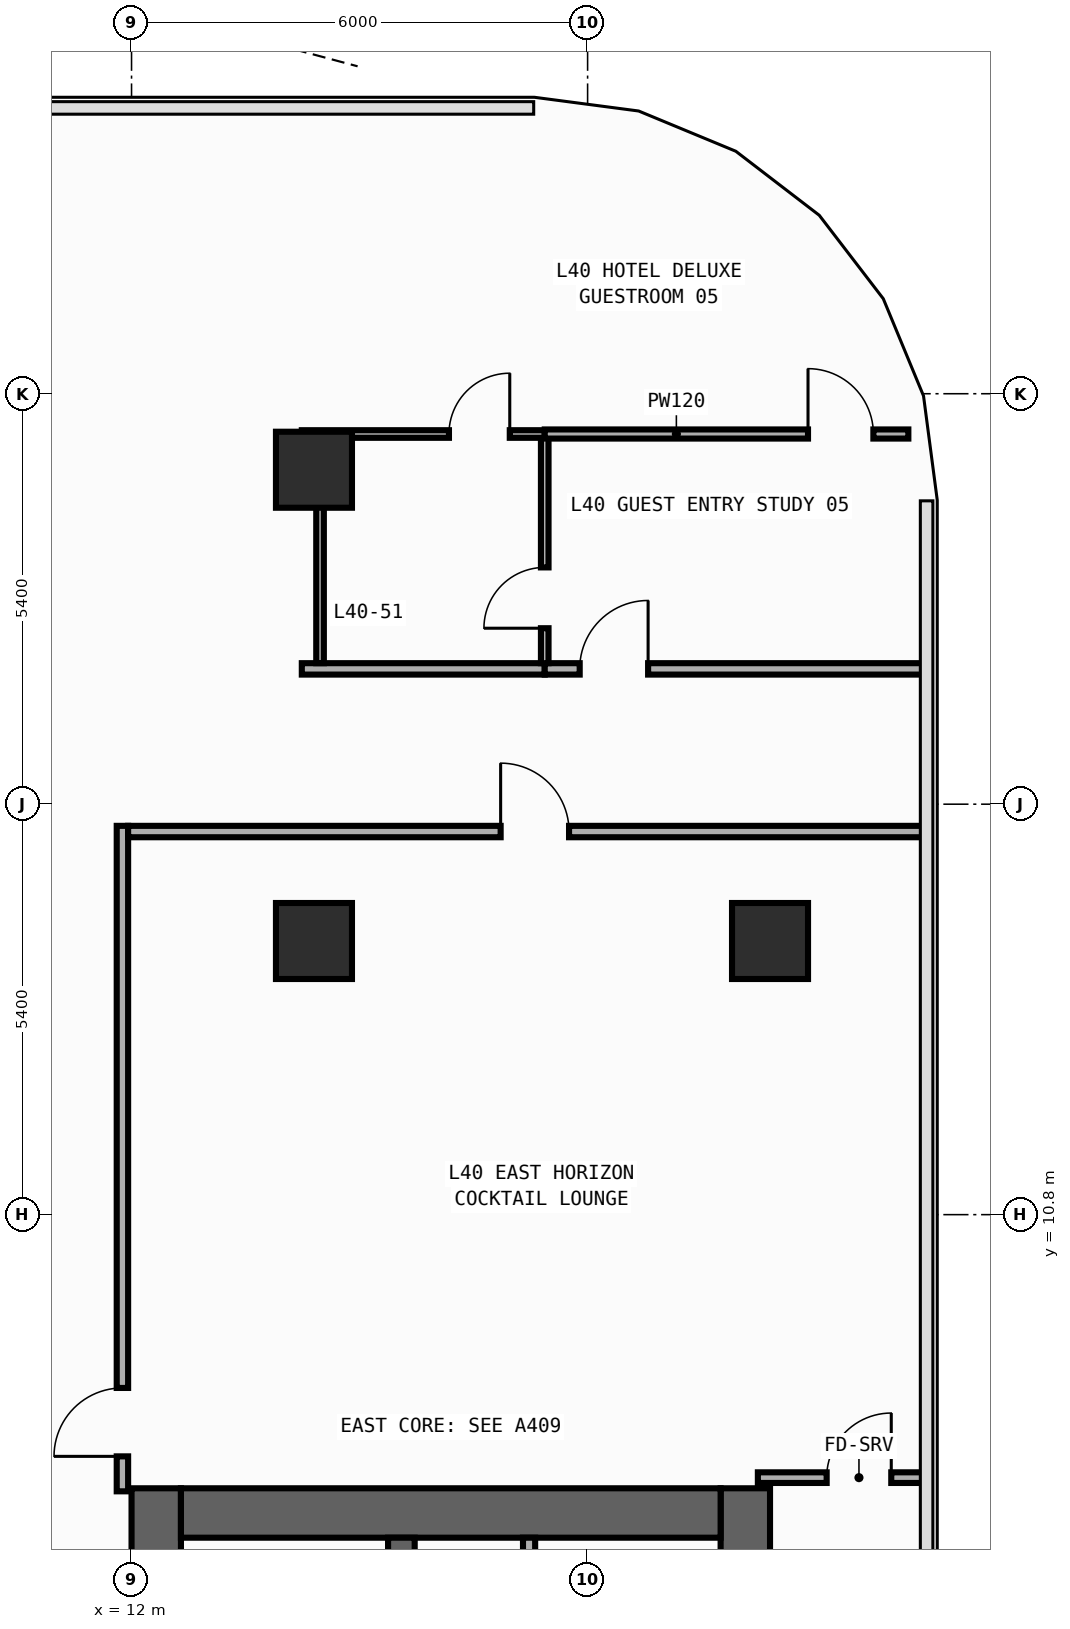
"""IFC4 building model, lengths in metres.
Left out: names, types, materials, properties, quantities, classifications, styles, units other than length and angle.
Written with IfcOpenShell. Run it as: python <this file> out.ifc"""

import sys

from ifc_helpers import new_model, si_unit, direction, frame, frame_2d, origin, origin_2d, place, context, subcontext, project, spatial, rectangle, extrude, element, fill, save


model = new_model("IFC4")
c1 = context("Model", 3, precision=1e-05, world=origin(), true_north=direction((0.0, 1.0)))
c2 = subcontext(c1, "Body", "Model", "MODEL_VIEW")
j1 = project(units=[si_unit("LENGTHUNIT", "METRE"), si_unit("PLANEANGLEUNIT", "RADIAN")], contexts=[c1])
p1 = place(None, origin())
s1 = spatial("IfcSite", under=j1, at=p1, CompositionType="ELEMENT")
p2 = place(p1, origin())
s2 = spatial("IfcBuilding", under=s1, at=p2, CompositionType="ELEMENT")
p3 = place(p2, frame((0.0, 0.0, 176.4)))
s3 = spatial("IfcBuildingStorey", under=s2, at=p3, CompositionType="ELEMENT", Elevation=176.4)
p4 = place(p3, frame((12.325, -19.8, 0.0), z_axis=(0.0, 0.0, 1.0), x_axis=(0.0, 1.0, 0.0)))
e1 = element("IfcWall", 1, at=p4, inside=s3, PredefinedType="SHEAR", context=c2, shape_type="SweptSolid", body=[
    extrude(rectangle(XDim=27.0, YDim=0.65, at=frame_2d((13.5, 0.0))), origin(), (0.0, 0.0, 1.0), 3.54),
])
p5 = place(p4, frame((23.05, 0.0, 0.0)))
e2 = element("IfcOpeningElement", 2, at=p5, cuts=e1, PredefinedType="OPENING", context=c2, shape_type="SweptSolid", body=[
    extrude(rectangle(XDim=1.1, YDim=2.2, at=frame_2d((0.55, 1.1))), frame((0.0, 0.335, 0.0), z_axis=(0.0, -1.0, 0.0), x_axis=(1.0, 0.0, 0.0)), (0.0, 0.0, 1.0), 0.67),
])
p6 = place(p4, frame((19.85, 0.0, 0.0)))
e3 = element("IfcOpeningElement", 3, at=p6, cuts=e1, PredefinedType="OPENING", context=c2, shape_type="SweptSolid", body=[
    extrude(rectangle(XDim=1.1, YDim=2.2, at=frame_2d((0.55, 1.1))), frame((0.0, 0.335, 0.0), z_axis=(0.0, -1.0, 0.0), x_axis=(1.0, 0.0, 0.0)), (0.0, 0.0, 1.0), 0.67),
])
p7 = place(p4, frame((16.65, 0.0, 0.0)))
e4 = element("IfcOpeningElement", 4, at=p7, cuts=e1, PredefinedType="OPENING", context=c2, shape_type="SweptSolid", body=[
    extrude(rectangle(XDim=1.1, YDim=2.2, at=frame_2d((0.55, 1.1))), frame((0.0, 0.335, 0.0), z_axis=(0.0, -1.0, 0.0), x_axis=(1.0, 0.0, 0.0)), (0.0, 0.0, 1.0), 0.67),
])
p8 = place(p4, frame((7.175, 0.0, 0.0)))
e5 = element("IfcOpeningElement", 5, at=p8, cuts=e1, PredefinedType="OPENING", context=c2, shape_type="SweptSolid", body=[
    extrude(rectangle(XDim=0.85, YDim=2.1, at=frame_2d((0.425, 1.05))), frame((0.0, 0.335, 0.0), z_axis=(0.0, -1.0, 0.0), x_axis=(1.0, 0.0, 0.0)), (0.0, 0.0, 1.0), 0.67),
])
p9 = place(p4, frame((10.375, 0.0, 0.0)))
e6 = element("IfcOpeningElement", 6, at=p9, cuts=e1, PredefinedType="OPENING", context=c2, shape_type="SweptSolid", body=[
    extrude(rectangle(XDim=0.85, YDim=2.1, at=frame_2d((0.425, 1.05))), frame((0.0, 0.335, 0.0), z_axis=(0.0, -1.0, 0.0), x_axis=(1.0, 0.0, 0.0)), (0.0, 0.0, 1.0), 0.67),
])
p10 = place(p4, frame((12.725, 0.0, 0.0)))
e7 = element("IfcOpeningElement", 7, at=p10, cuts=e1, PredefinedType="OPENING", context=c2, shape_type="SweptSolid", body=[
    extrude(rectangle(XDim=1.15, YDim=2.2, at=frame_2d((0.575, 1.1))), frame((0.0, 0.335, 0.0), z_axis=(0.0, -1.0, 0.0), x_axis=(1.0, 0.0, 0.0)), (0.0, 0.0, 1.0), 0.67),
])
p11 = place(p4, frame((25.125, 0.0, 0.0)))
e8 = element("IfcOpeningElement", 8, at=p11, cuts=e1, PredefinedType="OPENING", context=c2, shape_type="SweptSolid", body=[
    extrude(rectangle(XDim=0.85, YDim=2.1, at=frame_2d((0.425, 1.05))), frame((0.0, 0.335, 0.0), z_axis=(0.0, -1.0, 0.0), x_axis=(1.0, 0.0, 0.0)), (0.0, 0.0, 1.0), 0.67),
])
p12 = place(p3, frame((20.075, -19.8, 0.0), z_axis=(0.0, 0.0, 1.0), x_axis=(0.0, 1.0, 0.0)))
e9 = element("IfcWall", 9, at=p12, inside=s3, PredefinedType="SHEAR", context=c2, shape_type="SweptSolid", body=[
    extrude(rectangle(XDim=27.0, YDim=0.65, at=frame_2d((13.5, 0.0))), origin(), (0.0, 0.0, 1.0), 3.54),
])
p13 = place(p3, frame((12.65, 6.875, 0.0), z_axis=(0.0, 0.0, 1.0), x_axis=(1.0, 0.0, 0.0)))
e10 = element("IfcWall", 10, at=p13, inside=s3, PredefinedType="SHEAR", context=c2, shape_type="SweptSolid", body=[
    extrude(rectangle(XDim=7.1, YDim=0.65, at=frame_2d((3.55, 0.0))), origin(), (0.0, 0.0, 1.0), 3.54),
])
p14 = place(p3, frame((15.55, -19.15, 0.0), z_axis=(0.0, 0.0, 1.0), x_axis=(0.0, 1.0, 0.0)))
e11 = element("IfcWall", 11, at=p14, inside=s3, PredefinedType="SHEAR", context=c2, shape_type="SweptSolid", body=[
    extrude(rectangle(XDim=25.7, YDim=0.35, at=frame_2d((12.85, 0.0))), origin(), (0.0, 0.0, 1.0), 3.54),
])
p15 = place(p14, frame((12.075, 0.0, 0.0)))
e12 = element("IfcOpeningElement", 12, at=p15, cuts=e11, PredefinedType="OPENING", context=c2, shape_type="SweptSolid", body=[
    extrude(rectangle(XDim=1.15, YDim=2.2, at=frame_2d((0.575, 1.1))), frame((0.0, 0.185, 0.0), z_axis=(0.0, -1.0, 0.0), x_axis=(1.0, 0.0, 0.0)), (0.0, 0.0, 1.0), 0.37),
])
p16 = place(p14, frame((24.475, 0.0, 0.0)))
e13 = element("IfcOpeningElement", 13, at=p16, cuts=e11, PredefinedType="OPENING", context=c2, shape_type="SweptSolid", body=[
    extrude(rectangle(XDim=0.85, YDim=2.1, at=frame_2d((0.425, 1.05))), frame((0.0, 0.185, 0.0), z_axis=(0.0, -1.0, 0.0), x_axis=(1.0, 0.0, 0.0)), (0.0, 0.0, 1.0), 0.37),
])
for number, where, z_axis, x_axis in (
    (14, (20.4, 14.4, 0.0), (0.0, 0.0, 1.0), (1.0, 0.0, 0.0)),
    (15, (14.4, 14.4, 0.0), (0.0, 0.0, 1.0), (1.0, 0.0, 0.0)),
    (16, (14.4, 20.6, 0.0), (0.0, 0.0, 1.0), (1.0, 0.0, 0.0)),
):
    element("IfcColumn", number, at=place(p3, frame(where, z_axis=z_axis, x_axis=x_axis)), inside=s3, PredefinedType="COLUMN", context=c2, shape_type="SweptSolid", body=[
        extrude(rectangle(XDim=1.0, YDim=1.0, at=origin_2d()), origin(), (0.0, 0.0, 1.0), 3.8),
    ])
p17 = place(p3, frame((17.23, 4.17, 0.0), z_axis=(0.0, 0.0, 1.0), x_axis=(0.0, 1.0, 0.0)))
e17 = element("IfcWall", 17, at=p17, inside=s3, PredefinedType="PARTITIONING", context=c2, shape_type="SweptSolid", body=[
    extrude(rectangle(XDim=2.38, YDim=0.16, at=frame_2d((1.19, 0.0))), origin(), (0.0, 0.0, 1.0), 3.54),
])
p18 = place(p17, frame((0.46, 0.0, 0.0)))
e18 = element("IfcOpeningElement", 18, at=p18, cuts=e17, PredefinedType="OPENING", context=c2, shape_type="SweptSolid", body=[
    extrude(rectangle(XDim=0.85, YDim=2.1, at=frame_2d((0.425, 1.05))), frame((0.0, 0.09, 0.0), z_axis=(0.0, -1.0, 0.0), x_axis=(1.0, 0.0, 0.0)), (0.0, 0.0, 1.0), 0.18),
])
p19 = place(p3, frame((11.88, 7.16, 0.0), z_axis=(0.0, 0.0, 1.0), x_axis=(0.0, 1.0, 0.0)))
e19 = element("IfcWall", 19, at=p19, inside=s3, PredefinedType="PARTITIONING", context=c2, shape_type="SweptSolid", body=[
    extrude(rectangle(XDim=8.755, YDim=0.15, at=frame_2d((4.377, 0.0))), origin(), (0.0, 0.0, 1.0), 3.54),
])
p20 = place(p19, frame((0.46, 0.0, 0.0)))
e20 = element("IfcOpeningElement", 20, at=p20, cuts=e19, PredefinedType="OPENING", context=c2, shape_type="SweptSolid", body=[
    extrude(rectangle(XDim=0.9, YDim=2.15, at=frame_2d((0.45, 1.075))), frame((0.0, 0.085, 0.0), z_axis=(0.0, -1.0, 0.0), x_axis=(1.0, 0.0, 0.0)), (0.0, 0.0, 1.0), 0.17),
])
p21 = place(p3, frame((14.24, 17.98, 0.0), z_axis=(0.0, 0.0, 1.0), x_axis=(1.0, 0.0, 0.0)))
e21 = element("IfcWall", 21, at=p21, inside=s3, PredefinedType="PARTITIONING", context=c2, shape_type="SweptSolid", body=[
    extrude(rectangle(XDim=3.196, YDim=0.15, at=frame_2d((1.598, 0.0))), origin(), (0.0, 0.0, 1.0), 3.54),
])
p22 = place(p3, frame((17.436, 17.98, 0.0), z_axis=(0.0, 0.0, 1.0), x_axis=(1.0, 0.0, 0.0)))
e22 = element("IfcWall", 22, at=p22, inside=s3, PredefinedType="PARTITIONING", context=c2, shape_type="SweptSolid", body=[
    extrude(rectangle(XDim=5.019, YDim=0.15, at=frame_2d((2.51, 0.0))), origin(), (0.0, 0.0, 1.0), 3.54),
])
p23 = place(p22, frame((0.46, 0.0, 0.0)))
e23 = element("IfcOpeningElement", 23, at=p23, cuts=e22, PredefinedType="OPENING", context=c2, shape_type="SweptSolid", body=[
    extrude(rectangle(XDim=0.9, YDim=2.15, at=frame_2d((0.45, 1.075))), frame((0.0, 0.085, 0.0), z_axis=(0.0, -1.0, 0.0), x_axis=(1.0, 0.0, 0.0)), (0.0, 0.0, 1.0), 0.17),
])
p24 = place(p3, frame((11.955, 15.84, 0.0), z_axis=(0.0, 0.0, 1.0), x_axis=(1.0, 0.0, 0.0)))
e24 = element("IfcWall", 24, at=p24, inside=s3, PredefinedType="PARTITIONING", context=c2, shape_type="SweptSolid", body=[
    extrude(rectangle(XDim=10.5, YDim=0.15, at=frame_2d((5.25, 0.0))), origin(), (0.0, 0.0, 1.0), 3.54),
])
p25 = place(p24, frame((4.901, 0.0, 0.0)))
e25 = element("IfcOpeningElement", 25, at=p25, cuts=e24, PredefinedType="OPENING", context=c2, shape_type="SweptSolid", body=[
    extrude(rectangle(XDim=0.9, YDim=2.15, at=frame_2d((0.45, 1.075))), frame((0.0, 0.085, 0.0), z_axis=(0.0, -1.0, 0.0), x_axis=(1.0, 0.0, 0.0)), (0.0, 0.0, 1.0), 0.17),
])
p26 = place(p3, frame((17.436, 18.055, 0.0), z_axis=(0.0, 0.0, 1.0), x_axis=(0.0, 1.0, 0.0)))
e26 = element("IfcWall", 26, at=p26, inside=s3, PredefinedType="PARTITIONING", context=c2, shape_type="SweptSolid", body=[
    extrude(rectangle(XDim=2.965, YDim=0.1, at=frame_2d((1.482, 0.0))), origin(), (0.0, 0.0, 1.0), 3.54),
])
p27 = place(p26, frame((0.46, 0.0, 0.0)))
e27 = element("IfcOpeningElement", 27, at=p27, cuts=e26, PredefinedType="OPENING", context=c2, shape_type="SweptSolid", body=[
    extrude(rectangle(XDim=0.8, YDim=2.1, at=frame_2d((0.4, 1.05))), frame((0.0, 0.06, 0.0), z_axis=(0.0, -1.0, 0.0), x_axis=(1.0, 0.0, 0.0)), (0.0, 0.0, 1.0), 0.12),
])
p28 = place(p3, frame((14.24, 21.07, 0.0), z_axis=(0.0, 0.0, 1.0), x_axis=(1.0, 0.0, 0.0)))
e28 = element("IfcWall", 28, at=p28, inside=s3, PredefinedType="PARTITIONING", context=c2, shape_type="SweptSolid", body=[
    extrude(rectangle(XDim=3.196, YDim=0.1, at=frame_2d((1.598, 0.0))), origin(), (0.0, 0.0, 1.0), 3.54),
])
p29 = place(p28, frame((1.936, 0.0, 0.0)))
e29 = element("IfcOpeningElement", 29, at=p29, cuts=e28, PredefinedType="OPENING", context=c2, shape_type="SweptSolid", body=[
    extrude(rectangle(XDim=0.8, YDim=2.1, at=frame_2d((0.4, 1.05))), frame((0.0, 0.06, 0.0), z_axis=(0.0, -1.0, 0.0), x_axis=(1.0, 0.0, 0.0)), (0.0, 0.0, 1.0), 0.12),
])
p30 = place(p3, frame((17.436, 21.07, 0.0), z_axis=(0.0, 0.0, 1.0), x_axis=(1.0, 0.0, 0.0)))
e30 = element("IfcWall", 30, at=p30, inside=s3, PredefinedType="PARTITIONING", context=c2, shape_type="SweptSolid", body=[
    extrude(rectangle(XDim=4.784, YDim=0.12, at=frame_2d((2.392, 0.0))), origin(), (0.0, 0.0, 1.0), 3.54),
])
p31 = place(p30, frame((3.464, 0.0, 0.0)))
e31 = element("IfcOpeningElement", 31, at=p31, cuts=e30, PredefinedType="OPENING", context=c2, shape_type="SweptSolid", body=[
    extrude(rectangle(XDim=0.86, YDim=2.15, at=frame_2d((0.43, 1.075))), frame((0.0, 0.07, 0.0), z_axis=(0.0, -1.0, 0.0), x_axis=(1.0, 0.0, 0.0)), (0.0, 0.0, 1.0), 0.14),
])
p32 = place(p3, frame((20.24, 7.34, 0.0), z_axis=(0.0, 0.0, 1.0), x_axis=(1.0, 0.0, 0.0)))
e32 = element("IfcWall", 32, at=p32, inside=s3, PredefinedType="PARTITIONING", context=c2, shape_type="SweptSolid", body=[
    extrude(rectangle(XDim=2.215, YDim=0.14, at=frame_2d((1.107, 0.0))), origin(), (0.0, 0.0, 1.0), 3.54),
])
p33 = place(p32, frame((0.905, 0.0, 0.0)))
e33 = element("IfcOpeningElement", 33, at=p33, cuts=e32, PredefinedType="OPENING", context=c2, shape_type="SweptSolid", body=[
    extrude(rectangle(XDim=0.85, YDim=2.1, at=frame_2d((0.425, 1.05))), frame((0.0, 0.08, 0.0), z_axis=(0.0, -1.0, 0.0), x_axis=(1.0, 0.0, 0.0)), (0.0, 0.0, 1.0), 0.16),
])
p34 = place(p3, frame((14.48, 18.055, 0.0), z_axis=(0.0, 0.0, 1.0), x_axis=(0.0, 1.0, 0.0)))
e34 = element("IfcWall", 34, at=p34, inside=s3, PredefinedType="PARTITIONING", context=c2, shape_type="SweptSolid", body=[
    extrude(rectangle(XDim=2.965, YDim=0.1, at=frame_2d((1.482, 0.0))), origin(), (0.0, 0.0, 1.0), 2.952),
])
p35 = place(p20, origin())
e35 = element("IfcDoor", 35, at=p35, inside=s3, OperationType="SINGLE_SWING_LEFT", PredefinedType="DOOR", context=c2, shape_type="SweptSolid", body=[
    extrude(rectangle(XDim=0.9, YDim=2.15, at=frame_2d((0.45, 1.075))), frame((0.0, 0.025, 0.0), z_axis=(0.0, -1.0, 0.0), x_axis=(1.0, 0.0, 0.0)), (0.0, 0.0, 1.0), 0.05),
])
fill(e20, e35)
p36 = place(p23, origin())
e36 = element("IfcDoor", 36, at=p36, inside=s3, OperationType="SINGLE_SWING_RIGHT", PredefinedType="DOOR", context=c2, shape_type="SweptSolid", body=[
    extrude(rectangle(XDim=0.9, YDim=2.15, at=frame_2d((0.45, 1.075))), frame((0.0, 0.025, 0.0), z_axis=(0.0, -1.0, 0.0), x_axis=(1.0, 0.0, 0.0)), (0.0, 0.0, 1.0), 0.05),
])
fill(e23, e36)
p37 = place(p25, origin())
e37 = element("IfcDoor", 37, at=p37, inside=s3, OperationType="SINGLE_SWING_LEFT", PredefinedType="DOOR", context=c2, shape_type="SweptSolid", body=[
    extrude(rectangle(XDim=0.9, YDim=2.15, at=frame_2d((0.45, 1.075))), frame((0.0, 0.025, 0.0), z_axis=(0.0, -1.0, 0.0), x_axis=(1.0, 0.0, 0.0)), (0.0, 0.0, 1.0), 0.05),
])
fill(e25, e37)
p38 = place(p27, origin())
e38 = element("IfcDoor", 38, at=p38, inside=s3, OperationType="SINGLE_SWING_LEFT", PredefinedType="DOOR", context=c2, shape_type="SweptSolid", body=[
    extrude(rectangle(XDim=0.8, YDim=2.1, at=frame_2d((0.4, 1.05))), frame((0.0, 0.025, 0.0), z_axis=(0.0, -1.0, 0.0), x_axis=(1.0, 0.0, 0.0)), (0.0, 0.0, 1.0), 0.05),
])
fill(e27, e38)
p39 = place(p29, origin())
e39 = element("IfcDoor", 39, at=p39, inside=s3, OperationType="SINGLE_SWING_RIGHT", PredefinedType="DOOR", context=c2, shape_type="SweptSolid", body=[
    extrude(rectangle(XDim=0.8, YDim=2.1, at=frame_2d((0.4, 1.05))), frame((0.0, 0.025, 0.0), z_axis=(0.0, -1.0, 0.0), x_axis=(1.0, 0.0, 0.0)), (0.0, 0.0, 1.0), 0.05),
])
fill(e29, e39)
p40 = place(p31, origin())
e40 = element("IfcDoor", 40, at=p40, inside=s3, OperationType="SINGLE_SWING_LEFT", PredefinedType="DOOR", context=c2, shape_type="SweptSolid", body=[
    extrude(rectangle(XDim=0.86, YDim=2.15, at=frame_2d((0.43, 1.075))), frame((0.0, 0.025, 0.0), z_axis=(0.0, -1.0, 0.0), x_axis=(1.0, 0.0, 0.0)), (0.0, 0.0, 1.0), 0.05),
])
fill(e31, e40)
p41 = place(p33, origin())
e41 = element("IfcDoor", 41, at=p41, inside=s3, OperationType="SINGLE_SWING_RIGHT", PredefinedType="DOOR", context=c2, shape_type="SweptSolid", body=[
    extrude(rectangle(XDim=0.85, YDim=2.1, at=frame_2d((0.425, 1.05))), frame((0.0, 0.025, 0.0), z_axis=(0.0, -1.0, 0.0), x_axis=(1.0, 0.0, 0.0)), (0.0, 0.0, 1.0), 0.05),
])
fill(e33, e41)
save(model, sys.argv[1])
